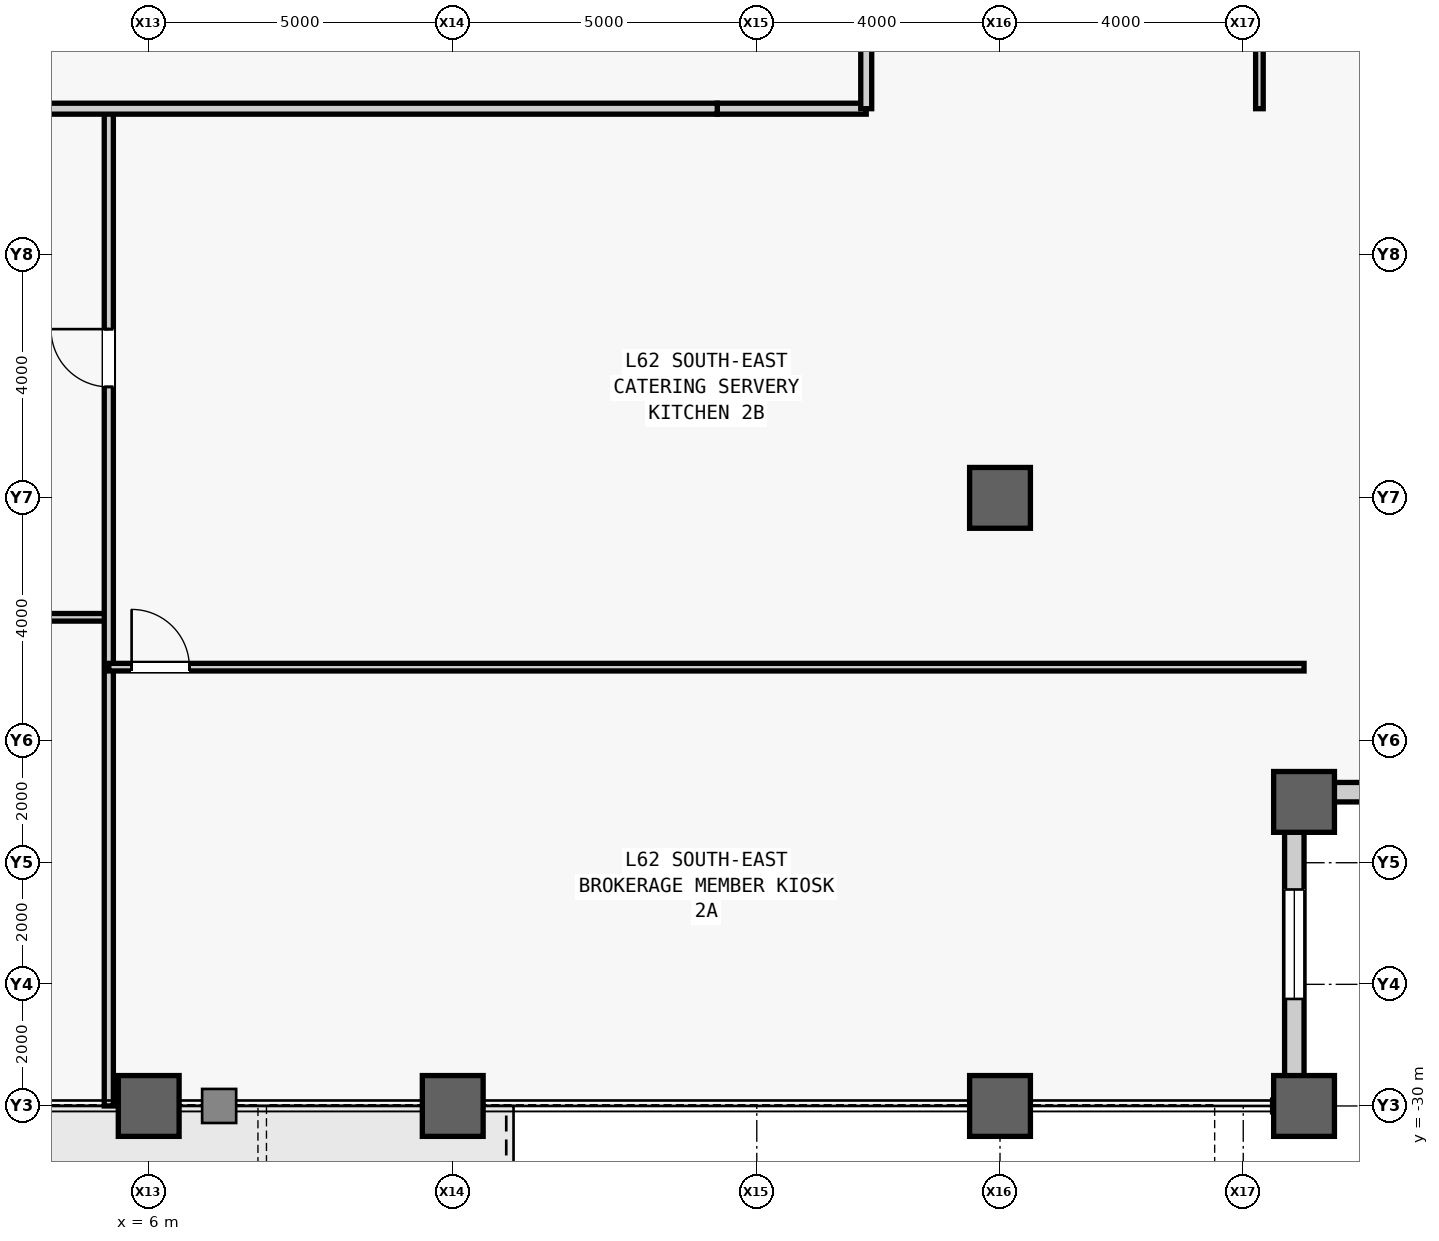
"""IFC4 building model, lengths in metres.
Left out: names, types, materials, properties, quantities, classifications, styles, units other than length and angle.
Written with IfcOpenShell. Run it as: python <this file> out.ifc"""

import sys

from ifc_helpers import new_model, si_unit, direction, frame, frame_2d, origin, origin_2d, place, context, subcontext, project, spatial, rectangle, hollow_rectangle, extrude, source, transform, mapped, element, fill, save


model = new_model("IFC4")
c1 = context("Model", 3, precision=1e-05, world=origin(), true_north=direction((0.0, 1.0)))
c2 = subcontext(c1, "Body", "Model", "MODEL_VIEW")
j1 = project(units=[si_unit("LENGTHUNIT", "METRE"), si_unit("PLANEANGLEUNIT", "RADIAN")], contexts=[c1])
p1 = place(None, origin())
s1 = spatial("IfcSite", under=j1, at=p1, CompositionType="ELEMENT")
p2 = place(p1, origin())
s2 = spatial("IfcBuilding", under=s1, at=p2, CompositionType="ELEMENT")
p3 = place(p2, frame((0.0, 0.0, 263.1)))
s3 = spatial("IfcBuildingStorey", under=s2, at=p3, CompositionType="ELEMENT", Elevation=263.1)
m1 = source(origin(), c2, "Body", "SweptSolid", [
    extrude(hollow_rectangle(XDim=1.0, YDim=1.0, WallThickness=0.055, at=origin_2d()), origin(), (0.0, 0.0, 1.0), 5.2),
])
for number, where, z_axis, x_axis in (
    (1, (6.0, -30.0, 0.0), (0.0, 0.0, 1.0), (1.0, 0.0, 0.0)),
    (2, (11.0, -30.0, 0.0), (0.0, 0.0, 1.0), (1.0, 0.0, 0.0)),
    (3, (20.0, -30.0, 0.0), (0.0, 0.0, 1.0), (1.0, 0.0, 0.0)),
    (4, (20.0, -20.0, 0.0), (0.0, 0.0, 1.0), (1.0, 0.0, 0.0)),
    (5, (25.0, -30.0, 0.0), (0.0, 0.0, 1.0), (1.0, 0.0, 0.0)),
    (6, (25.0, -25.0, 0.0), (0.0, 0.0, 1.0), (1.0, 0.0, 0.0)),
):
    element("IfcColumn", number, at=place(p3, frame(where, z_axis=z_axis, x_axis=x_axis)), inside=s3, PredefinedType="COLUMN", context=c2, shape_type="MappedRepresentation", body=[
        mapped(m1, transform((0.0, 0.0, 0.0), scale=1.0)),
    ])
m2 = source(origin(), c2, "Body", "SweptSolid", [
    extrude(rectangle(XDim=4.68, YDim=0.32, at=frame_2d((2.34, 0.0))), origin(), (0.0, 0.0, 1.0), 3.984),
])
p4 = place(p3, frame((24.84, -29.68, 0.0), z_axis=(0.0, 0.0, 1.0), x_axis=(0.0, 1.0, 0.0)))
e7 = element("IfcWall", 7, at=p4, inside=s3, PredefinedType="STANDARD", context=c2, shape_type="MappedRepresentation", body=[
    mapped(m2, transform((0.0, 0.0, 0.0), scale=1.0)),
])
m3 = source(origin(), c2, "Body", "SweptSolid", [
    extrude(rectangle(XDim=1.8, YDim=2.4, at=frame_2d((0.9, 1.2))), frame((0.0, 0.17, 0.0), z_axis=(0.0, -1.0, 0.0), x_axis=(1.0, 0.0, 0.0)), (0.0, 0.0, 1.0), 0.34),
])
p5 = place(p4, frame((1.44, 0.0, 0.7)))
e8 = element("IfcOpeningElement", 8, at=p5, cuts=e7, PredefinedType="OPENING", context=c2, shape_type="MappedRepresentation", body=[
    mapped(m3, transform((0.0, 0.0, 0.0), scale=1.0)),
])
p6 = place(p3, frame((25.0, -24.84, 0.0), z_axis=(0.0, 0.0, 1.0), x_axis=(1.0, 0.0, 0.0)))
e9 = element("IfcWall", 9, at=p6, inside=s3, PredefinedType="STANDARD", context=c2, shape_type="MappedRepresentation", body=[
    mapped(m2, transform((0.0, 0.0, 0.0), scale=1.0)),
])
p7 = place(p6, frame((1.44, 0.0, 0.7)))
e10 = element("IfcOpeningElement", 10, at=p7, cuts=e9, PredefinedType="OPENING", context=c2, shape_type="MappedRepresentation", body=[
    mapped(m3, transform((0.0, 0.0, 0.0), scale=1.0)),
])
m4 = source(origin(), c2, "Body", "SweptSolid", [
    extrude(rectangle(XDim=2.45, YDim=0.18, at=frame_2d((1.225, 0.0))), origin(), (0.0, 0.0, 1.0), 4.6),
])
p8 = place(p3, frame((15.35, -13.6, 0.0), z_axis=(0.0, 0.0, 1.0), x_axis=(1.0, 0.0, 0.0)))
e11 = element("IfcWall", 11, at=p8, inside=s3, PredefinedType="PARTITIONING", context=c2, shape_type="MappedRepresentation", body=[
    mapped(m4, transform((0.0, 0.0, 0.0), scale=1.0)),
])
m5 = source(origin(), c2, "Body", "SweptSolid", [
    extrude(rectangle(XDim=15.444, YDim=0.125, at=frame_2d((7.722, 0.0))), origin(), (0.0, 0.0, 1.0), 4.6),
])
p9 = place(p3, frame((-10.1, -21.964, 0.0), z_axis=(0.0, 0.0, 1.0), x_axis=(1.0, 0.0, 0.0)))
e12 = element("IfcWall", 12, at=p9, inside=s3, PredefinedType="PARTITIONING", context=c2, shape_type="MappedRepresentation", body=[
    mapped(m5, transform((0.0, 0.0, 0.0), scale=1.0)),
])
m6 = source(origin(), c2, "Body", "SweptSolid", [
    extrude(rectangle(XDim=0.95, YDim=2.15, at=frame_2d((0.475, 1.075))), frame((0.0, 0.073, 0.0), z_axis=(0.0, -1.0, 0.0), x_axis=(1.0, 0.0, 0.0)), (0.0, 0.0, 1.0), 0.145),
])
p10 = place(p9, frame((10.027, 0.0, 0.0)))
e13 = element("IfcOpeningElement", 13, at=p10, cuts=e12, PredefinedType="OPENING", context=c2, shape_type="MappedRepresentation", body=[
    mapped(m6, transform((0.0, 0.0, 0.0), scale=1.0)),
])
m7 = source(origin(), c2, "Body", "SweptSolid", [
    extrude(rectangle(XDim=16.4, YDim=0.15, at=frame_2d((8.2, 0.0))), origin(), (0.0, 0.0, 1.0), 4.6),
])
p11 = place(p3, frame((5.344, -30.0, 0.0), z_axis=(0.0, 0.0, 1.0), x_axis=(0.0, 1.0, 0.0)))
e14 = element("IfcWall", 14, at=p11, inside=s3, PredefinedType="PARTITIONING", context=c2, shape_type="MappedRepresentation", body=[
    mapped(m7, transform((0.0, 0.0, 0.0), scale=1.0)),
])
m8 = source(origin(), c2, "Body", "SweptSolid", [
    extrude(rectangle(XDim=0.95, YDim=2.15, at=frame_2d((0.475, 1.075))), frame((0.0, 0.085, 0.0), z_axis=(0.0, -1.0, 0.0), x_axis=(1.0, 0.0, 0.0)), (0.0, 0.0, 1.0), 0.17),
])
p12 = place(p11, frame((11.825, 0.0, 0.0)))
e15 = element("IfcOpeningElement", 15, at=p12, cuts=e14, PredefinedType="OPENING", context=c2, shape_type="MappedRepresentation", body=[
    mapped(m8, transform((0.0, 0.0, 0.0), scale=1.0)),
])
m9 = source(origin(), c2, "Body", "SweptSolid", [
    extrude(rectangle(XDim=19.656, YDim=0.125, at=frame_2d((9.828, 0.0))), origin(), (0.0, 0.0, 1.0), 4.6),
])
p13 = place(p3, frame((5.344, -22.784, 0.0), z_axis=(0.0, 0.0, 1.0), x_axis=(1.0, 0.0, 0.0)))
e16 = element("IfcWall", 16, at=p13, inside=s3, PredefinedType="PARTITIONING", context=c2, shape_type="MappedRepresentation", body=[
    mapped(m9, transform((0.0, 0.0, 0.0), scale=1.0)),
])
p14 = place(p13, frame((0.375, 0.0, 0.0)))
e17 = element("IfcOpeningElement", 17, at=p14, cuts=e16, PredefinedType="OPENING", context=c2, shape_type="MappedRepresentation", body=[
    mapped(m6, transform((0.0, 0.0, 0.0), scale=1.0)),
])
m10 = source(origin(), c2, "Body", "SweptSolid", [
    extrude(rectangle(XDim=25.45, YDim=0.18, at=frame_2d((12.725, 0.0))), origin(), (0.0, 0.0, 1.0), 4.6),
])
p15 = place(p3, frame((-10.1, -13.6, 0.0), z_axis=(0.0, 0.0, 1.0), x_axis=(1.0, 0.0, 0.0)))
e18 = element("IfcWall", 18, at=p15, inside=s3, PredefinedType="PARTITIONING", context=c2, shape_type="MappedRepresentation", body=[
    mapped(m10, transform((0.0, 0.0, 0.0), scale=1.0)),
])
m11 = source(origin(), c2, "Body", "SweptSolid", [
    extrude(rectangle(XDim=8.9, YDim=0.125, at=frame_2d((4.45, 0.0))), origin(), (0.0, 0.0, 1.0), 4.6),
])
p16 = place(p3, frame((24.266, -13.6, 0.0), z_axis=(0.0, 0.0, 1.0), x_axis=(0.0, 1.0, 0.0)))
e19 = element("IfcWall", 19, at=p16, inside=s3, PredefinedType="PARTITIONING", context=c2, shape_type="MappedRepresentation", body=[
    mapped(m11, transform((0.0, 0.0, 0.0), scale=1.0)),
])
m12 = source(origin(), c2, "Body", "SweptSolid", [
    extrude(rectangle(XDim=8.9, YDim=0.18, at=frame_2d((4.45, 0.0))), origin(), (0.0, 0.0, 1.0), 4.6),
])
p17 = place(p3, frame((17.8, -13.6, 0.0), z_axis=(0.0, 0.0, 1.0), x_axis=(0.0, 1.0, 0.0)))
e20 = element("IfcWall", 20, at=p17, inside=s3, PredefinedType="PARTITIONING", context=c2, shape_type="MappedRepresentation", body=[
    mapped(m12, transform((0.0, 0.0, 0.0), scale=1.0)),
])
m13 = source(origin(), c2, "Body", "SweptSolid", [
    extrude(rectangle(XDim=1.8, YDim=2.4, at=frame_2d((0.9, 1.2))), frame((0.0, 0.03, 0.0), z_axis=(0.0, -1.0, 0.0), x_axis=(1.0, 0.0, 0.0)), (0.0, 0.0, 1.0), 0.06),
])
p18 = place(p5, origin())
e21 = element("IfcWindow", 21, at=p18, inside=s3, PartitioningType="SINGLE_PANEL", PredefinedType="WINDOW", context=c2, shape_type="MappedRepresentation", body=[
    mapped(m13, transform((0.0, 0.0, 0.0), scale=1.0)),
])
fill(e8, e21)
m14 = source(origin(), c2, "Body", "SweptSolid", [
    extrude(rectangle(XDim=0.95, YDim=2.15, at=frame_2d((0.475, 1.075))), frame((0.0, 0.025, 0.0), z_axis=(0.0, -1.0, 0.0), x_axis=(1.0, 0.0, 0.0)), (0.0, 0.0, 1.0), 0.05),
])
p19 = place(p12, origin())
e22 = element("IfcDoor", 22, at=p19, inside=s3, OperationType="SINGLE_SWING_RIGHT", PredefinedType="DOOR", context=c2, shape_type="MappedRepresentation", body=[
    mapped(m14, transform((0.0, 0.0, 0.0), scale=1.0)),
])
fill(e15, e22)
p20 = place(p14, origin())
e23 = element("IfcDoor", 23, at=p20, inside=s3, OperationType="SINGLE_SWING_LEFT", PredefinedType="DOOR", context=c2, shape_type="MappedRepresentation", body=[
    mapped(m14, transform((0.0, 0.0, 0.0), scale=1.0)),
])
fill(e17, e23)
save(model, sys.argv[1])
